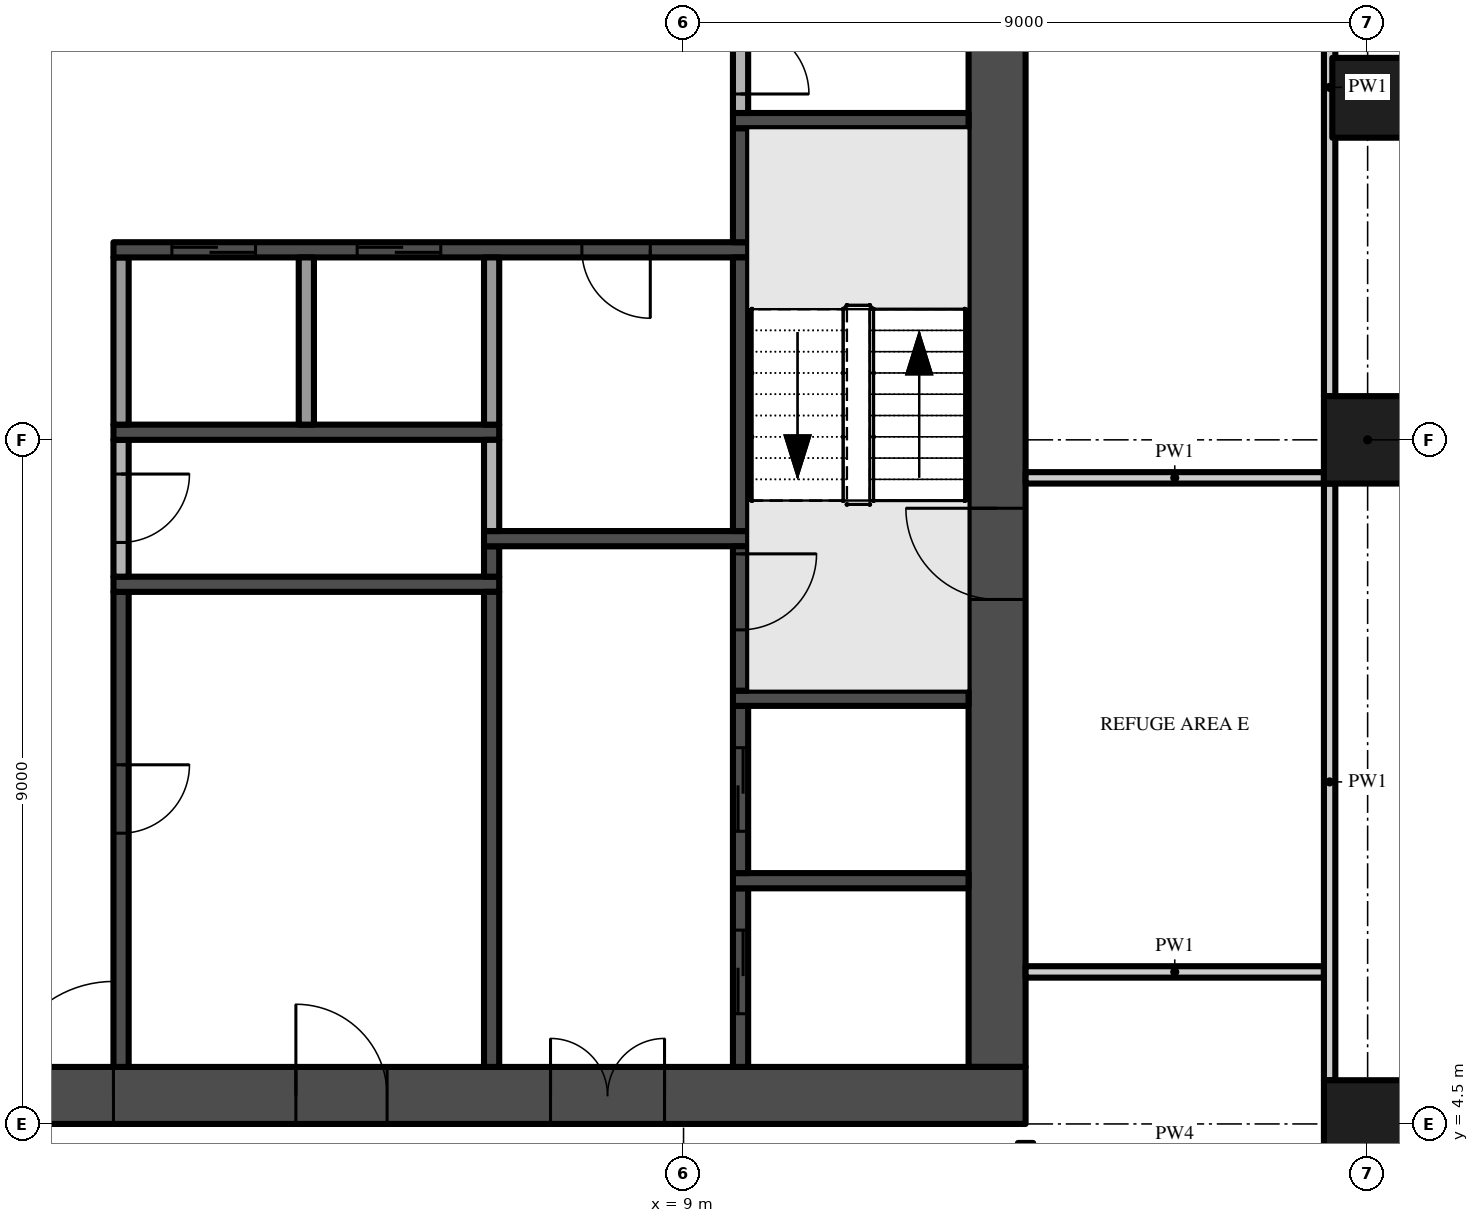
"""IFC4 building model, lengths in metres.
Left out: names, types, materials, properties, quantities, classifications, styles, units other than length and angle.
Written with IfcOpenShell. Run it as: python <this file> out.ifc"""

import sys

from ifc_helpers import new_model, si_unit, direction, frame, frame_2d, origin, origin_2d, place, context, subcontext, project, spatial, rectangle, extrude, element, fill, save


model = new_model("IFC4")
c1 = context("Model", 3, precision=1e-05, world=origin(), true_north=direction((0.0, 1.0)))
c2 = subcontext(c1, "Body", "Model", "MODEL_VIEW")
j1 = project(units=[si_unit("LENGTHUNIT", "METRE"), si_unit("PLANEANGLEUNIT", "RADIAN")], contexts=[c1])
p1 = place(None, origin())
s1 = spatial("IfcSite", under=j1, at=p1, CompositionType="ELEMENT")
p2 = place(p1, origin())
s2 = spatial("IfcBuilding", under=s1, at=p2, CompositionType="ELEMENT")
p3 = place(p2, frame((0.0, 0.0, 179.4)))
s3 = spatial("IfcBuildingStorey", under=s2, at=p3, CompositionType="ELEMENT", Elevation=179.4)
p4 = place(p3, frame((-13.5, 4.875, -0.3), z_axis=(0.0, 0.0, 1.0), x_axis=(1.0, 0.0, 0.0)))
e1 = element("IfcWall", 1, at=p4, inside=s3, PredefinedType="SHEAR", context=c2, shape_type="SweptSolid", body=[
    extrude(rectangle(XDim=27.0, YDim=0.75, at=frame_2d((13.5, 0.0))), origin(), (0.0, 0.0, 1.0), 5.0),
])
p5 = place(p4, frame((12.0, 0.0, 0.3)))
e2 = element("IfcOpeningElement", 2, at=p5, cuts=e1, PredefinedType="OPENING", context=c2, shape_type="SweptSolid", body=[
    extrude(rectangle(XDim=3.0, YDim=2.4, at=frame_2d((1.5, 1.2))), frame((0.0, 0.385, 0.0), z_axis=(0.0, -1.0, 0.0), x_axis=(1.0, 0.0, 0.0)), (0.0, 0.0, 1.0), 0.77),
])
p6 = place(p4, frame((4.9, 0.0, 0.3)))
e3 = element("IfcOpeningElement", 3, at=p6, cuts=e1, PredefinedType="OPENING", context=c2, shape_type="SweptSolid", body=[
    extrude(rectangle(XDim=1.2, YDim=2.2, at=frame_2d((0.6, 1.1))), frame((0.0, 0.385, 0.0), z_axis=(0.0, -1.0, 0.0), x_axis=(1.0, 0.0, 0.0)), (0.0, 0.0, 1.0), 0.77),
])
p7 = place(p4, frame((20.75, 0.0, 0.3)))
e4 = element("IfcOpeningElement", 4, at=p7, cuts=e1, PredefinedType="OPENING", context=c2, shape_type="SweptSolid", body=[
    extrude(rectangle(XDim=1.5, YDim=2.2, at=frame_2d((0.75, 1.1))), frame((0.0, 0.385, 0.0), z_axis=(0.0, -1.0, 0.0), x_axis=(1.0, 0.0, 0.0)), (0.0, 0.0, 1.0), 0.77),
])
p8 = place(p4, frame((17.4, 0.0, 0.3)))
e5 = element("IfcOpeningElement", 5, at=p8, cuts=e1, PredefinedType="OPENING", context=c2, shape_type="SweptSolid", body=[
    extrude(rectangle(XDim=1.2, YDim=2.2, at=frame_2d((0.6, 1.1))), frame((0.0, 0.385, 0.0), z_axis=(0.0, -1.0, 0.0), x_axis=(1.0, 0.0, 0.0)), (0.0, 0.0, 1.0), 0.77),
])
p9 = place(p3, frame((13.125, 5.25, -0.3), z_axis=(0.0, 0.0, 1.0), x_axis=(0.0, 1.0, 0.0)))
e6 = element("IfcWall", 6, at=p9, inside=s3, PredefinedType="SHEAR", context=c2, shape_type="SweptSolid", body=[
    extrude(rectangle(XDim=16.5, YDim=0.75, at=frame_2d((8.25, 0.0))), origin(), (0.0, 0.0, 1.0), 5.0),
])
p10 = place(p9, frame((6.15, 0.0, 0.3)))
e7 = element("IfcOpeningElement", 7, at=p10, cuts=e6, PredefinedType="OPENING", context=c2, shape_type="SweptSolid", body=[
    extrude(rectangle(XDim=1.2, YDim=2.2, at=frame_2d((0.6, 1.1))), frame((0.0, 0.385, 0.0), z_axis=(0.0, -1.0, 0.0), x_axis=(1.0, 0.0, 0.0)), (0.0, 0.0, 1.0), 0.77),
])
for number, where, z_axis, x_axis in (
    (8, (18.0, 13.5, 0.0), (0.0, 0.0, 1.0), (1.0, 0.0, 0.0)),
    (9, (18.0, 4.5, 0.0), (0.0, 0.0, 1.0), (1.0, 0.0, 0.0)),
):
    element("IfcColumn", number, at=place(p3, frame(where, z_axis=z_axis, x_axis=x_axis)), inside=s3, PredefinedType="COLUMN", context=c2, shape_type="SweptSolid", body=[
        extrude(rectangle(XDim=1.15, YDim=1.15, at=origin_2d()), origin(), (0.0, 0.0, 1.0), 4.7),
    ])
p11 = place(p3, frame((18.06, 18.0, 0.063), z_axis=(0.691571492114, 0.0, 0.722308016912), x_axis=(0.0, 1.0, 0.0)))
e10 = element("IfcColumn", 10, at=p11, inside=s3, PredefinedType="COLUMN", context=c2, shape_type="SweptSolid", body=[
    extrude(rectangle(XDim=1.05, YDim=1.05, at=origin_2d()), origin(), (0.0, 0.0, 1.0), 6.332),
])
p12 = place(p3, frame((1.6, 11.5, 0.0), z_axis=(0.0, 0.0, 1.0), x_axis=(0.0, -1.0, 0.0)))
e11 = element("IfcWall", 11, at=p12, inside=s3, PredefinedType="SHEAR", context=c2, shape_type="SweptSolid", body=[
    extrude(rectangle(XDim=6.25, YDim=0.2, at=frame_2d((3.125, 0.0))), origin(), (0.0, 0.0, 1.0), 4.7),
])
p13 = place(p12, frame((2.275, 0.0, 0.0)))
e12 = element("IfcOpeningElement", 12, at=p13, cuts=e11, PredefinedType="OPENING", context=c2, shape_type="SweptSolid", body=[
    extrude(rectangle(XDim=0.9, YDim=2.1, at=frame_2d((0.45, 1.05))), frame((0.0, 0.11, 0.0), z_axis=(0.0, -1.0, 0.0), x_axis=(1.0, 0.0, 0.0)), (0.0, 0.0, 1.0), 0.22),
])
p14 = place(p3, frame((1.5, 11.6, 0.0), z_axis=(0.0, 0.0, 1.0), x_axis=(1.0, 0.0, 0.0)))
e13 = element("IfcWall", 13, at=p14, inside=s3, PredefinedType="SHEAR", context=c2, shape_type="SweptSolid", body=[
    extrude(rectangle(XDim=5.075, YDim=0.2, at=frame_2d((2.538, 0.0))), origin(), (0.0, 0.0, 1.0), 4.7),
])
p15 = place(p3, frame((1.6, 13.5, 0.0), z_axis=(0.0, 0.0, 1.0), x_axis=(0.0, -1.0, 0.0)))
e14 = element("IfcWall", 14, at=p15, inside=s3, PredefinedType="PARTITIONING", context=c2, shape_type="SweptSolid", body=[
    extrude(rectangle(XDim=1.8, YDim=0.2, at=frame_2d((0.9, 0.0))), origin(), (0.0, 0.0, 1.0), 4.7),
])
p16 = place(p15, frame((0.45, 0.0, 0.0)))
e15 = element("IfcOpeningElement", 15, at=p16, cuts=e14, PredefinedType="OPENING", context=c2, shape_type="SweptSolid", body=[
    extrude(rectangle(XDim=0.9, YDim=2.1, at=frame_2d((0.45, 1.05))), frame((0.0, 0.11, 0.0), z_axis=(0.0, -1.0, 0.0), x_axis=(1.0, 0.0, 0.0)), (0.0, 0.0, 1.0), 0.22),
])
p17 = place(p3, frame((1.5, 13.6, 0.0), z_axis=(0.0, 0.0, 1.0), x_axis=(1.0, 0.0, 0.0)))
e16 = element("IfcWall", 16, at=p17, inside=s3, PredefinedType="SHEAR", context=c2, shape_type="SweptSolid", body=[
    extrude(rectangle(XDim=5.075, YDim=0.2, at=frame_2d((2.538, 0.0))), origin(), (0.0, 0.0, 1.0), 4.7),
])
p18 = place(p3, frame((1.6, 13.7, 0.0), z_axis=(0.0, 0.0, 1.0), x_axis=(0.0, 1.0, 0.0)))
e17 = element("IfcWall", 17, at=p18, inside=s3, PredefinedType="PARTITIONING", context=c2, shape_type="SweptSolid", body=[
    extrude(rectangle(XDim=2.2, YDim=0.2, at=frame_2d((1.1, 0.0))), origin(), (0.0, 0.0, 1.0), 4.7),
])
p19 = place(p3, frame((9.85, 16.0, 0.0), z_axis=(0.0, 0.0, 1.0), x_axis=(-1.0, 0.0, 0.0)))
e18 = element("IfcWall", 18, at=p19, inside=s3, PredefinedType="SHEAR", context=c2, shape_type="SweptSolid", body=[
    extrude(rectangle(XDim=8.35, YDim=0.2, at=frame_2d((4.175, 0.0))), origin(), (0.0, 0.0, 1.0), 4.7),
])
p20 = place(p19, frame((6.481, 0.0, 0.0)))
e19 = element("IfcOpeningElement", 19, at=p20, cuts=e18, PredefinedType="OPENING", context=c2, shape_type="SweptSolid", body=[
    extrude(rectangle(XDim=1.1, YDim=2.1, at=frame_2d((0.55, 1.05))), frame((0.0, 0.11, 0.0), z_axis=(0.0, -1.0, 0.0), x_axis=(1.0, 0.0, 0.0)), (0.0, 0.0, 1.0), 0.22),
])
p21 = place(p19, frame((4.044, 0.0, 0.0)))
e20 = element("IfcOpeningElement", 20, at=p21, cuts=e18, PredefinedType="OPENING", context=c2, shape_type="SweptSolid", body=[
    extrude(rectangle(XDim=1.1, YDim=2.1, at=frame_2d((0.55, 1.05))), frame((0.0, 0.11, 0.0), z_axis=(0.0, -1.0, 0.0), x_axis=(1.0, 0.0, 0.0)), (0.0, 0.0, 1.0), 0.22),
])
p22 = place(p19, frame((1.288, 0.0, 0.0)))
e21 = element("IfcOpeningElement", 21, at=p22, cuts=e18, PredefinedType="OPENING", context=c2, shape_type="SweptSolid", body=[
    extrude(rectangle(XDim=0.9, YDim=2.1, at=frame_2d((0.45, 1.05))), frame((0.0, 0.11, 0.0), z_axis=(0.0, -1.0, 0.0), x_axis=(1.0, 0.0, 0.0)), (0.0, 0.0, 1.0), 0.22),
])
p23 = place(p3, frame((4.037, 13.7, 0.0), z_axis=(0.0, 0.0, 1.0), x_axis=(0.0, 1.0, 0.0)))
e22 = element("IfcWall", 22, at=p23, inside=s3, PredefinedType="PARTITIONING", context=c2, shape_type="SweptSolid", body=[
    extrude(rectangle(XDim=2.2, YDim=0.2, at=frame_2d((1.1, 0.0))), origin(), (0.0, 0.0, 1.0), 4.7),
])
p24 = place(p3, frame((6.475, 5.25, 0.0), z_axis=(0.0, 0.0, 1.0), x_axis=(0.0, 1.0, 0.0)))
e23 = element("IfcWall", 23, at=p24, inside=s3, PredefinedType="SHEAR", context=c2, shape_type="SweptSolid", body=[
    extrude(rectangle(XDim=6.25, YDim=0.2, at=frame_2d((3.125, 0.0))), origin(), (0.0, 0.0, 1.0), 4.7),
])
p25 = place(p3, frame((6.475, 11.7, 0.0), z_axis=(0.0, 0.0, 1.0), x_axis=(0.0, 1.0, 0.0)))
e24 = element("IfcWall", 24, at=p25, inside=s3, PredefinedType="SHEAR", context=c2, shape_type="SweptSolid", body=[
    extrude(rectangle(XDim=0.4, YDim=0.2, at=frame_2d((0.2, 0.0))), origin(), (0.0, 0.0, 1.0), 4.7),
])
p26 = place(p3, frame((6.375, 12.2, 0.0), z_axis=(0.0, 0.0, 1.0), x_axis=(1.0, 0.0, 0.0)))
e25 = element("IfcWall", 25, at=p26, inside=s3, PredefinedType="SHEAR", context=c2, shape_type="SweptSolid", body=[
    extrude(rectangle(XDim=3.475, YDim=0.2, at=frame_2d((1.738, 0.0))), origin(), (0.0, 0.0, 1.0), 4.7),
])
p27 = place(p3, frame((6.475, 12.3, 0.0), z_axis=(0.0, 0.0, 1.0), x_axis=(0.0, 1.0, 0.0)))
e26 = element("IfcWall", 26, at=p27, inside=s3, PredefinedType="PARTITIONING", context=c2, shape_type="SweptSolid", body=[
    extrude(rectangle(XDim=1.2, YDim=0.2, at=frame_2d((0.6, 0.0))), origin(), (0.0, 0.0, 1.0), 4.7),
])
p28 = place(p3, frame((6.475, 13.7, 0.0), z_axis=(0.0, 0.0, 1.0), x_axis=(0.0, 1.0, 0.0)))
e27 = element("IfcWall", 27, at=p28, inside=s3, PredefinedType="PARTITIONING", context=c2, shape_type="SweptSolid", body=[
    extrude(rectangle(XDim=2.2, YDim=0.2, at=frame_2d((1.1, 0.0))), origin(), (0.0, 0.0, 1.0), 4.7),
])
p29 = place(p3, frame((9.75, 5.25, 0.0), z_axis=(0.0, 0.0, 1.0), x_axis=(0.0, 1.0, 0.0)))
e28 = element("IfcWall", 28, at=p29, inside=s3, PredefinedType="SHEAR", context=c2, shape_type="SweptSolid", body=[
    extrude(rectangle(XDim=2.35, YDim=0.2, at=frame_2d((1.175, 0.0))), origin(), (0.0, 0.0, 1.0), 4.7),
])
p30 = place(p29, frame((0.7, 0.0, 0.0)))
e29 = element("IfcOpeningElement", 29, at=p30, cuts=e28, PredefinedType="OPENING", context=c2, shape_type="SweptSolid", body=[
    extrude(rectangle(XDim=1.1, YDim=2.1, at=frame_2d((0.55, 1.05))), frame((0.0, 0.11, 0.0), z_axis=(0.0, -1.0, 0.0), x_axis=(1.0, 0.0, 0.0)), (0.0, 0.0, 1.0), 0.22),
])
p31 = place(p3, frame((9.65, 7.7, 0.0), z_axis=(0.0, 0.0, 1.0), x_axis=(1.0, 0.0, 0.0)))
e30 = element("IfcWall", 30, at=p31, inside=s3, PredefinedType="SHEAR", context=c2, shape_type="SweptSolid", body=[
    extrude(rectangle(XDim=3.1, YDim=0.2, at=frame_2d((1.55, 0.0))), origin(), (0.0, 0.0, 1.0), 4.7),
])
p32 = place(p3, frame((9.75, 7.8, 0.0), z_axis=(0.0, 0.0, 1.0), x_axis=(0.0, 1.0, 0.0)))
e31 = element("IfcWall", 31, at=p32, inside=s3, PredefinedType="SHEAR", context=c2, shape_type="SweptSolid", body=[
    extrude(rectangle(XDim=2.2, YDim=0.2, at=frame_2d((1.1, 0.0))), origin(), (0.0, 0.0, 1.0), 4.7),
])
p33 = place(p32, frame((0.55, 0.0, 0.0)))
e32 = element("IfcOpeningElement", 32, at=p33, cuts=e31, PredefinedType="OPENING", context=c2, shape_type="SweptSolid", body=[
    extrude(rectangle(XDim=1.1, YDim=2.1, at=frame_2d((0.55, 1.05))), frame((0.0, 0.11, 0.0), z_axis=(0.0, -1.0, 0.0), x_axis=(1.0, 0.0, 0.0)), (0.0, 0.0, 1.0), 0.22),
])
p34 = place(p3, frame((9.65, 10.1, 0.0), z_axis=(0.0, 0.0, 1.0), x_axis=(1.0, 0.0, 0.0)))
e33 = element("IfcWall", 33, at=p34, inside=s3, PredefinedType="SHEAR", context=c2, shape_type="SweptSolid", body=[
    extrude(rectangle(XDim=3.1, YDim=0.2, at=frame_2d((1.55, 0.0))), origin(), (0.0, 0.0, 1.0), 4.7),
])
p35 = place(p3, frame((9.75, 12.1, 0.0), z_axis=(0.0, 0.0, 1.0), x_axis=(0.0, -1.0, 0.0)))
e34 = element("IfcWall", 34, at=p35, inside=s3, PredefinedType="SHEAR", context=c2, shape_type="SweptSolid", body=[
    extrude(rectangle(XDim=1.9, YDim=0.2, at=frame_2d((0.95, 0.0))), origin(), (0.0, 0.0, 1.0), 4.7),
])
p36 = place(p35, frame((0.1, 0.0, 0.0)))
e35 = element("IfcOpeningElement", 35, at=p36, cuts=e34, PredefinedType="OPENING", context=c2, shape_type="SweptSolid", body=[
    extrude(rectangle(XDim=1.0, YDim=2.2, at=frame_2d((0.5, 1.1))), frame((0.0, 0.11, 0.0), z_axis=(0.0, -1.0, 0.0), x_axis=(1.0, 0.0, 0.0)), (0.0, 0.0, 1.0), 0.22),
])
p37 = place(p3, frame((9.75, 12.3, 0.0), z_axis=(0.0, 0.0, 1.0), x_axis=(0.0, 1.0, 0.0)))
e36 = element("IfcWall", 36, at=p37, inside=s3, PredefinedType="SHEAR", context=c2, shape_type="SweptSolid", body=[
    extrude(rectangle(XDim=3.6, YDim=0.2, at=frame_2d((1.8, 0.0))), origin(), (0.0, 0.0, 1.0), 4.7),
])
p38 = place(p3, frame((9.75, 16.1, 0.0), z_axis=(0.0, 0.0, 1.0), x_axis=(0.0, 1.0, 0.0)))
e37 = element("IfcWall", 37, at=p38, inside=s3, PredefinedType="SHEAR", context=c2, shape_type="SweptSolid", body=[
    extrude(rectangle(XDim=1.5, YDim=0.2, at=frame_2d((0.75, 0.0))), origin(), (0.0, 0.0, 1.0), 4.7),
])
p39 = place(p3, frame((9.65, 17.7, 0.0), z_axis=(0.0, 0.0, 1.0), x_axis=(1.0, 0.0, 0.0)))
e38 = element("IfcWall", 38, at=p39, inside=s3, PredefinedType="SHEAR", context=c2, shape_type="SweptSolid", body=[
    extrude(rectangle(XDim=3.1, YDim=0.2, at=frame_2d((1.55, 0.0))), origin(), (0.0, 0.0, 1.0), 4.7),
])
p40 = place(p3, frame((9.75, 19.2, 0.0), z_axis=(0.0, 0.0, 1.0), x_axis=(0.0, -1.0, 0.0)))
e39 = element("IfcWall", 39, at=p40, inside=s3, PredefinedType="PARTITIONING", context=c2, shape_type="SweptSolid", body=[
    extrude(rectangle(XDim=1.4, YDim=0.2, at=frame_2d((0.7, 0.0))), origin(), (0.0, 0.0, 1.0), 4.7),
])
p41 = place(p40, frame((0.25, 0.0, 0.0)))
e40 = element("IfcOpeningElement", 40, at=p41, cuts=e39, PredefinedType="OPENING", context=c2, shape_type="SweptSolid", body=[
    extrude(rectangle(XDim=0.9, YDim=2.1, at=frame_2d((0.45, 1.05))), frame((0.0, 0.11, 0.0), z_axis=(0.0, -1.0, 0.0), x_axis=(1.0, 0.0, 0.0)), (0.0, 0.0, 1.0), 0.22),
])
for number, where, z_axis, x_axis in (
    (41, (13.5, 6.5, 0.0), (0.0, 0.0, 1.0), (1.0, 0.0, 0.0)),
    (42, (13.5, 13.0, 0.0), (0.0, 0.0, 1.0), (1.0, 0.0, 0.0)),
):
    element("IfcWall", number, at=place(p3, frame(where, z_axis=z_axis, x_axis=x_axis)), inside=s3, PredefinedType="PARTITIONING", context=c2, shape_type="SweptSolid", body=[
        extrude(rectangle(XDim=3.925, YDim=0.15, at=frame_2d((1.962, 0.0))), origin(), (0.0, 0.0, 1.0), 4.7),
    ])
p42 = place(p3, frame((17.5, 5.075, 0.0), z_axis=(0.0, 0.0, 1.0), x_axis=(0.0, 1.0, 0.0)))
e43 = element("IfcWall", 43, at=p42, inside=s3, PredefinedType="PARTITIONING", context=c2, shape_type="SweptSolid", body=[
    extrude(rectangle(XDim=7.85, YDim=0.15, at=frame_2d((3.925, 0.0))), origin(), (0.0, 0.0, 1.0), 4.7),
])
p43 = place(p3, frame((17.5, 14.075, 0.0), z_axis=(0.0, 0.0, 1.0), x_axis=(0.0, 1.0, 0.0)))
e44 = element("IfcWall", 44, at=p43, inside=s3, PredefinedType="PARTITIONING", context=c2, shape_type="SweptSolid", body=[
    extrude(rectangle(XDim=8.125, YDim=0.15, at=frame_2d((4.062, 0.0))), origin(), (0.0, 0.0, 1.0), 4.7),
])
p44 = place(p5, frame((3.0, 0.0, 0.0), z_axis=(0.0, 0.0, 1.0), x_axis=(-1.0, 0.0, 0.0)))
e45 = element("IfcDoor", 45, at=p44, inside=s3, OperationType="DOUBLE_DOOR_SINGLE_SWING", PredefinedType="DOOR", context=c2, shape_type="SweptSolid", body=[
    extrude(rectangle(XDim=3.0, YDim=2.4, at=frame_2d((1.5, 1.2))), frame((0.0, 0.025, 0.0), z_axis=(0.0, -1.0, 0.0), x_axis=(1.0, 0.0, 0.0)), (0.0, 0.0, 1.0), 0.05),
])
fill(e2, e45)
p45 = place(p10, frame((1.2, 0.0, 0.0), z_axis=(0.0, 0.0, 1.0), x_axis=(-1.0, 0.0, 0.0)))
e46 = element("IfcDoor", 46, at=p45, inside=s3, OperationType="SINGLE_SWING_LEFT", PredefinedType="DOOR", context=c2, shape_type="SweptSolid", body=[
    extrude(rectangle(XDim=1.2, YDim=2.2, at=frame_2d((0.6, 1.1))), frame((0.0, 0.025, 0.0), z_axis=(0.0, -1.0, 0.0), x_axis=(1.0, 0.0, 0.0)), (0.0, 0.0, 1.0), 0.05),
])
fill(e7, e46)
p46 = place(p7, frame((1.5, 0.0, 0.0), z_axis=(0.0, 0.0, 1.0), x_axis=(-1.0, 0.0, 0.0)))
e47 = element("IfcDoor", 47, at=p46, inside=s3, OperationType="DOUBLE_DOOR_SINGLE_SWING", PredefinedType="DOOR", context=c2, shape_type="SweptSolid", body=[
    extrude(rectangle(XDim=1.5, YDim=2.2, at=frame_2d((0.75, 1.1))), frame((0.0, 0.025, 0.0), z_axis=(0.0, -1.0, 0.0), x_axis=(1.0, 0.0, 0.0)), (0.0, 0.0, 1.0), 0.05),
])
fill(e4, e47)
p47 = place(p8, frame((1.2, 0.0, 0.0), z_axis=(0.0, 0.0, 1.0), x_axis=(-1.0, 0.0, 0.0)))
e48 = element("IfcDoor", 48, at=p47, inside=s3, OperationType="SINGLE_SWING_RIGHT", PredefinedType="DOOR", context=c2, shape_type="SweptSolid", body=[
    extrude(rectangle(XDim=1.2, YDim=2.2, at=frame_2d((0.6, 1.1))), frame((0.0, 0.025, 0.0), z_axis=(0.0, -1.0, 0.0), x_axis=(1.0, 0.0, 0.0)), (0.0, 0.0, 1.0), 0.05),
])
fill(e5, e48)
p48 = place(p36, origin())
e49 = element("IfcDoor", 49, at=p48, inside=s3, OperationType="SINGLE_SWING_LEFT", PredefinedType="DOOR", context=c2, shape_type="SweptSolid", body=[
    extrude(rectangle(XDim=1.0, YDim=2.2, at=frame_2d((0.5, 1.1))), frame((0.0, 0.025, 0.0), z_axis=(0.0, -1.0, 0.0), x_axis=(1.0, 0.0, 0.0)), (0.0, 0.0, 1.0), 0.05),
])
fill(e35, e49)
p49 = place(p20, origin())
e50 = element("IfcDoor", 50, at=p49, inside=s3, OperationType="SLIDING_TO_RIGHT", PredefinedType="DOOR", context=c2, shape_type="SweptSolid", body=[
    extrude(rectangle(XDim=1.1, YDim=2.1, at=frame_2d((0.55, 1.05))), frame((0.0, 0.025, 0.0), z_axis=(0.0, -1.0, 0.0), x_axis=(1.0, 0.0, 0.0)), (0.0, 0.0, 1.0), 0.05),
])
fill(e19, e50)
p50 = place(p21, origin())
e51 = element("IfcDoor", 51, at=p50, inside=s3, OperationType="SLIDING_TO_RIGHT", PredefinedType="DOOR", context=c2, shape_type="SweptSolid", body=[
    extrude(rectangle(XDim=1.1, YDim=2.1, at=frame_2d((0.55, 1.05))), frame((0.0, 0.025, 0.0), z_axis=(0.0, -1.0, 0.0), x_axis=(1.0, 0.0, 0.0)), (0.0, 0.0, 1.0), 0.05),
])
fill(e20, e51)
p51 = place(p30, origin())
e52 = element("IfcDoor", 52, at=p51, inside=s3, OperationType="SLIDING_TO_RIGHT", PredefinedType="DOOR", context=c2, shape_type="SweptSolid", body=[
    extrude(rectangle(XDim=1.1, YDim=2.1, at=frame_2d((0.55, 1.05))), frame((0.0, 0.025, 0.0), z_axis=(0.0, -1.0, 0.0), x_axis=(1.0, 0.0, 0.0)), (0.0, 0.0, 1.0), 0.05),
])
fill(e29, e52)
p52 = place(p33, origin())
e53 = element("IfcDoor", 53, at=p52, inside=s3, OperationType="SLIDING_TO_RIGHT", PredefinedType="DOOR", context=c2, shape_type="SweptSolid", body=[
    extrude(rectangle(XDim=1.1, YDim=2.1, at=frame_2d((0.55, 1.05))), frame((0.0, 0.025, 0.0), z_axis=(0.0, -1.0, 0.0), x_axis=(1.0, 0.0, 0.0)), (0.0, 0.0, 1.0), 0.05),
])
fill(e32, e53)
p53 = place(p13, origin())
e54 = element("IfcDoor", 54, at=p53, inside=s3, OperationType="SINGLE_SWING_LEFT", PredefinedType="DOOR", context=c2, shape_type="SweptSolid", body=[
    extrude(rectangle(XDim=0.9, YDim=2.1, at=frame_2d((0.45, 1.05))), frame((0.0, 0.025, 0.0), z_axis=(0.0, -1.0, 0.0), x_axis=(1.0, 0.0, 0.0)), (0.0, 0.0, 1.0), 0.05),
])
fill(e12, e54)
p54 = place(p16, origin())
e55 = element("IfcDoor", 55, at=p54, inside=s3, OperationType="SINGLE_SWING_LEFT", PredefinedType="DOOR", context=c2, shape_type="SweptSolid", body=[
    extrude(rectangle(XDim=0.9, YDim=2.1, at=frame_2d((0.45, 1.05))), frame((0.0, 0.025, 0.0), z_axis=(0.0, -1.0, 0.0), x_axis=(1.0, 0.0, 0.0)), (0.0, 0.0, 1.0), 0.05),
])
fill(e15, e55)
p55 = place(p22, origin())
e56 = element("IfcDoor", 56, at=p55, inside=s3, OperationType="SINGLE_SWING_LEFT", PredefinedType="DOOR", context=c2, shape_type="SweptSolid", body=[
    extrude(rectangle(XDim=0.9, YDim=2.1, at=frame_2d((0.45, 1.05))), frame((0.0, 0.025, 0.0), z_axis=(0.0, -1.0, 0.0), x_axis=(1.0, 0.0, 0.0)), (0.0, 0.0, 1.0), 0.05),
])
fill(e21, e56)
p56 = place(p41, origin())
e57 = element("IfcDoor", 57, at=p56, inside=s3, OperationType="SINGLE_SWING_RIGHT", PredefinedType="DOOR", context=c2, shape_type="SweptSolid", body=[
    extrude(rectangle(XDim=0.9, YDim=2.1, at=frame_2d((0.45, 1.05))), frame((0.0, 0.025, 0.0), z_axis=(0.0, -1.0, 0.0), x_axis=(1.0, 0.0, 0.0)), (0.0, 0.0, 1.0), 0.05),
])
fill(e40, e57)
save(model, sys.argv[1])
